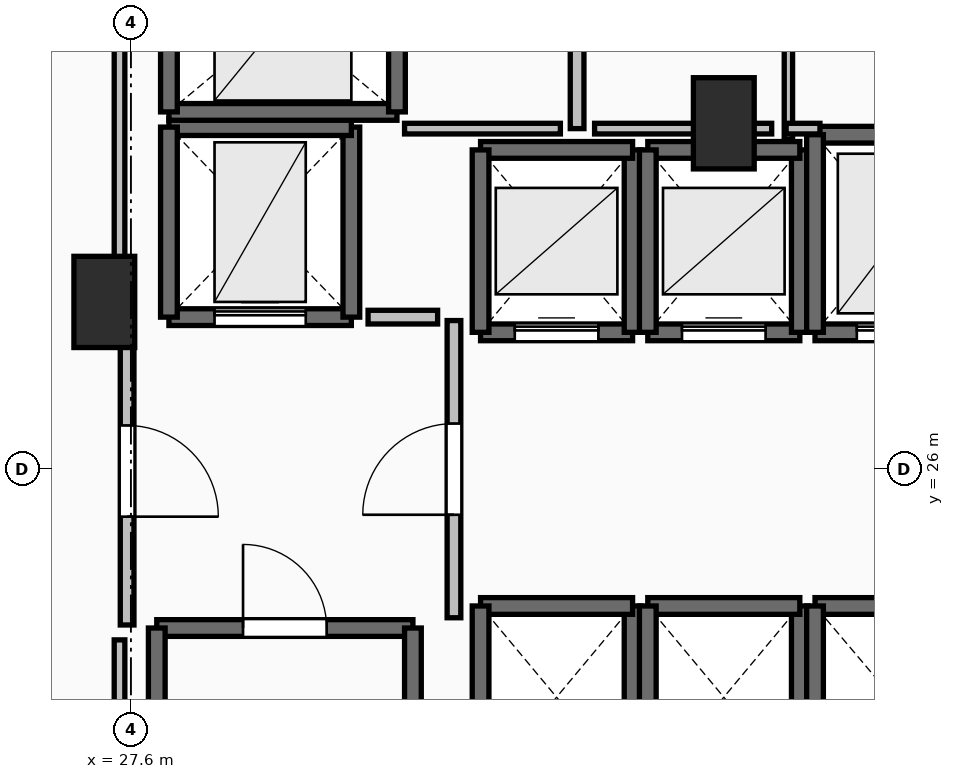
"""IFC4 building model, lengths in metres.
Left out: names, types, materials, properties, quantities, classifications, styles, units other than length and angle.
Written with IfcOpenShell. Run it as: python <this file> out.ifc"""

import sys

from ifc_helpers import new_model, si_unit, direction, frame, frame_2d, origin, origin_2d, place, context, subcontext, project, spatial, rectangle, extrude, element, fill, save


model = new_model("IFC4")
c1 = context("Model", 3, precision=1e-05, world=origin(), true_north=direction((0.0, 1.0)))
c2 = subcontext(c1, "Body", "Model", "MODEL_VIEW")
j1 = project(units=[si_unit("LENGTHUNIT", "METRE"), si_unit("PLANEANGLEUNIT", "RADIAN")], contexts=[c1])
p1 = place(None, origin())
s1 = spatial("IfcSite", under=j1, at=p1, CompositionType="ELEMENT")
p2 = place(p1, origin())
s2 = spatial("IfcBuilding", under=s1, at=p2, CompositionType="ELEMENT")
p3 = place(p2, frame((0.0, 0.0, 24.0)))
s3 = spatial("IfcBuildingStorey", under=s2, at=p3, CompositionType="ELEMENT", Elevation=24.0)
for number, where, z_axis, x_axis in (
    (1, (27.25, 28.2, 0.0), (0.0, 0.0, 1.0), (1.0, 0.0, 0.0)),
    (2, (35.4, 30.55, 0.0), (0.0, 0.0, 1.0), (1.0, 0.0, 0.0)),
):
    element("IfcColumn", number, at=place(p3, frame(where, z_axis=z_axis, x_axis=x_axis)), inside=s3, PredefinedType="PILASTER", context=c2, shape_type="SweptSolid", body=[
        extrude(rectangle(XDim=0.8, YDim=1.2, at=origin_2d()), origin(), (0.0, 0.0, 1.0), 3.5),
    ])
p4 = place(p3, frame((27.94, 23.91, 0.0), z_axis=(0.0, 0.0, 1.0), x_axis=(1.0, 0.0, 0.0)))
e3 = element("IfcWall", 3, at=p4, inside=s3, PredefinedType="SOLIDWALL", context=c2, shape_type="SweptSolid", body=[
    extrude(rectangle(XDim=3.37, YDim=0.22, at=frame_2d((1.685, 0.0))), origin(), (0.0, 0.0, 1.0), 3.24),
])
p5 = place(p4, frame((1.135, 0.0, 0.0)))
e4 = element("IfcOpeningElement", 4, at=p5, cuts=e3, PredefinedType="OPENING", context=c2, shape_type="SweptSolid", body=[
    extrude(rectangle(XDim=1.1, YDim=2.15, at=frame_2d((0.55, 1.075))), frame((0.0, 0.125, 0.0), z_axis=(0.0, -1.0, 0.0), x_axis=(1.0, 0.0, 0.0)), (0.0, 0.0, 1.0), 0.25),
])
for number, where, z_axis, x_axis in (
    (5, (31.31, 23.91, 0.0), (0.0, 0.0, 1.0), (0.0, -1.0, 0.0)),
    (6, (27.94, 16.49, 0.0), (0.0, 0.0, 1.0), (0.0, 1.0, 0.0)),
):
    element("IfcWall", number, at=place(p3, frame(where, z_axis=z_axis, x_axis=x_axis)), inside=s3, PredefinedType="SOLIDWALL", context=c2, shape_type="SweptSolid", body=[
        extrude(rectangle(XDim=7.42, YDim=0.22, at=frame_2d((3.71, 0.0))), origin(), (0.0, 0.0, 1.0), 3.24),
    ])
p6 = place(p3, frame((32.2, 27.8, 0.0), z_axis=(0.0, 0.0, 1.0), x_axis=(1.0, 0.0, 0.0)))
e7 = element("IfcWall", 7, at=p6, inside=s3, PredefinedType="SOLIDWALL", context=c2, shape_type="SweptSolid", body=[
    extrude(rectangle(XDim=2.0, YDim=0.22, at=frame_2d((1.0, 0.0))), origin(), (0.0, 0.0, 1.0), 3.24),
])
p7 = place(p6, frame((0.45, 0.0, 0.0)))
e8 = element("IfcOpeningElement", 8, at=p7, cuts=e7, PredefinedType="OPENING", context=c2, shape_type="SweptSolid", body=[
    extrude(rectangle(XDim=1.1, YDim=2.2, at=frame_2d((0.55, 1.1))), frame((0.0, 0.125, 0.0), z_axis=(0.0, -1.0, 0.0), x_axis=(1.0, 0.0, 0.0)), (0.0, 0.0, 1.0), 0.25),
])
p8 = place(p3, frame((34.2, 27.8, 0.0), z_axis=(0.0, 0.0, 1.0), x_axis=(0.0, 1.0, 0.0)))
e9 = element("IfcWall", 9, at=p8, inside=s3, PredefinedType="SOLIDWALL", context=c2, shape_type="SweptSolid", body=[
    extrude(rectangle(XDim=2.4, YDim=0.22, at=frame_2d((1.2, 0.0))), origin(), (0.0, 0.0, 1.0), 3.24),
])
p9 = place(p3, frame((34.2, 30.2, 0.0), z_axis=(0.0, 0.0, 1.0), x_axis=(-1.0, 0.0, 0.0)))
e10 = element("IfcWall", 10, at=p9, inside=s3, PredefinedType="SOLIDWALL", context=c2, shape_type="SweptSolid", body=[
    extrude(rectangle(XDim=2.0, YDim=0.22, at=frame_2d((1.0, 0.0))), origin(), (0.0, 0.0, 1.0), 3.24),
])
p10 = place(p3, frame((32.2, 30.2, 0.0), z_axis=(0.0, 0.0, 1.0), x_axis=(0.0, -1.0, 0.0)))
e11 = element("IfcWall", 11, at=p10, inside=s3, PredefinedType="SOLIDWALL", context=c2, shape_type="SweptSolid", body=[
    extrude(rectangle(XDim=2.4, YDim=0.22, at=frame_2d((1.2, 0.0))), origin(), (0.0, 0.0, 1.0), 3.24),
])
p11 = place(p3, frame((34.4, 27.8, 0.0), z_axis=(0.0, 0.0, 1.0), x_axis=(1.0, 0.0, 0.0)))
e12 = element("IfcWall", 12, at=p11, inside=s3, PredefinedType="SOLIDWALL", context=c2, shape_type="SweptSolid", body=[
    extrude(rectangle(XDim=2.0, YDim=0.22, at=frame_2d((1.0, 0.0))), origin(), (0.0, 0.0, 1.0), 3.24),
])
p12 = place(p11, frame((0.45, 0.0, 0.0)))
e13 = element("IfcOpeningElement", 13, at=p12, cuts=e12, PredefinedType="OPENING", context=c2, shape_type="SweptSolid", body=[
    extrude(rectangle(XDim=1.1, YDim=2.2, at=frame_2d((0.55, 1.1))), frame((0.0, 0.125, 0.0), z_axis=(0.0, -1.0, 0.0), x_axis=(1.0, 0.0, 0.0)), (0.0, 0.0, 1.0), 0.25),
])
p13 = place(p3, frame((36.4, 27.8, 0.0), z_axis=(0.0, 0.0, 1.0), x_axis=(0.0, 1.0, 0.0)))
e14 = element("IfcWall", 14, at=p13, inside=s3, PredefinedType="SOLIDWALL", context=c2, shape_type="SweptSolid", body=[
    extrude(rectangle(XDim=2.4, YDim=0.22, at=frame_2d((1.2, 0.0))), origin(), (0.0, 0.0, 1.0), 3.24),
])
p14 = place(p3, frame((36.4, 30.2, 0.0), z_axis=(0.0, 0.0, 1.0), x_axis=(-1.0, 0.0, 0.0)))
e15 = element("IfcWall", 15, at=p14, inside=s3, PredefinedType="SOLIDWALL", context=c2, shape_type="SweptSolid", body=[
    extrude(rectangle(XDim=2.0, YDim=0.22, at=frame_2d((1.0, 0.0))), origin(), (0.0, 0.0, 1.0), 3.24),
])
p15 = place(p3, frame((34.4, 30.2, 0.0), z_axis=(0.0, 0.0, 1.0), x_axis=(0.0, -1.0, 0.0)))
e16 = element("IfcWall", 16, at=p15, inside=s3, PredefinedType="SOLIDWALL", context=c2, shape_type="SweptSolid", body=[
    extrude(rectangle(XDim=2.4, YDim=0.22, at=frame_2d((1.2, 0.0))), origin(), (0.0, 0.0, 1.0), 3.24),
])
p16 = place(p3, frame((36.6, 27.8, 0.0), z_axis=(0.0, 0.0, 1.0), x_axis=(1.0, 0.0, 0.0)))
e17 = element("IfcWall", 17, at=p16, inside=s3, PredefinedType="SOLIDWALL", context=c2, shape_type="SweptSolid", body=[
    extrude(rectangle(XDim=2.2, YDim=0.22, at=frame_2d((1.1, 0.0))), origin(), (0.0, 0.0, 1.0), 3.24),
])
p17 = place(p16, frame((0.55, 0.0, 0.0)))
e18 = element("IfcOpeningElement", 18, at=p17, cuts=e17, PredefinedType="OPENING", context=c2, shape_type="SweptSolid", body=[
    extrude(rectangle(XDim=1.1, YDim=2.2, at=frame_2d((0.55, 1.1))), frame((0.0, 0.125, 0.0), z_axis=(0.0, -1.0, 0.0), x_axis=(1.0, 0.0, 0.0)), (0.0, 0.0, 1.0), 0.25),
])
p18 = place(p3, frame((38.8, 30.4, 0.0), z_axis=(0.0, 0.0, 1.0), x_axis=(-1.0, 0.0, 0.0)))
e19 = element("IfcWall", 19, at=p18, inside=s3, PredefinedType="SOLIDWALL", context=c2, shape_type="SweptSolid", body=[
    extrude(rectangle(XDim=2.2, YDim=0.22, at=frame_2d((1.1, 0.0))), origin(), (0.0, 0.0, 1.0), 3.24),
])
p19 = place(p3, frame((36.6, 30.4, 0.0), z_axis=(0.0, 0.0, 1.0), x_axis=(0.0, -1.0, 0.0)))
e20 = element("IfcWall", 20, at=p19, inside=s3, PredefinedType="SOLIDWALL", context=c2, shape_type="SweptSolid", body=[
    extrude(rectangle(XDim=2.6, YDim=0.22, at=frame_2d((1.3, 0.0))), origin(), (0.0, 0.0, 1.0), 3.24),
])
p20 = place(p3, frame((34.2, 21.8, 0.0), z_axis=(0.0, 0.0, 1.0), x_axis=(0.0, 1.0, 0.0)))
e21 = element("IfcWall", 21, at=p20, inside=s3, PredefinedType="SOLIDWALL", context=c2, shape_type="SweptSolid", body=[
    extrude(rectangle(XDim=2.4, YDim=0.22, at=frame_2d((1.2, 0.0))), origin(), (0.0, 0.0, 1.0), 3.24),
])
p21 = place(p3, frame((34.2, 24.2, 0.0), z_axis=(0.0, 0.0, 1.0), x_axis=(-1.0, 0.0, 0.0)))
e22 = element("IfcWall", 22, at=p21, inside=s3, PredefinedType="SOLIDWALL", context=c2, shape_type="SweptSolid", body=[
    extrude(rectangle(XDim=2.0, YDim=0.22, at=frame_2d((1.0, 0.0))), origin(), (0.0, 0.0, 1.0), 3.24),
])
for number, where, z_axis, x_axis in (
    (23, (32.2, 24.2, 0.0), (0.0, 0.0, 1.0), (0.0, -1.0, 0.0)),
    (24, (36.4, 21.8, 0.0), (0.0, 0.0, 1.0), (0.0, 1.0, 0.0)),
):
    element("IfcWall", number, at=place(p3, frame(where, z_axis=z_axis, x_axis=x_axis)), inside=s3, PredefinedType="SOLIDWALL", context=c2, shape_type="SweptSolid", body=[
        extrude(rectangle(XDim=2.4, YDim=0.22, at=frame_2d((1.2, 0.0))), origin(), (0.0, 0.0, 1.0), 3.24),
    ])
p22 = place(p3, frame((36.4, 24.2, 0.0), z_axis=(0.0, 0.0, 1.0), x_axis=(-1.0, 0.0, 0.0)))
e25 = element("IfcWall", 25, at=p22, inside=s3, PredefinedType="SOLIDWALL", context=c2, shape_type="SweptSolid", body=[
    extrude(rectangle(XDim=2.0, YDim=0.22, at=frame_2d((1.0, 0.0))), origin(), (0.0, 0.0, 1.0), 3.24),
])
p23 = place(p3, frame((34.4, 24.2, 0.0), z_axis=(0.0, 0.0, 1.0), x_axis=(0.0, -1.0, 0.0)))
e26 = element("IfcWall", 26, at=p23, inside=s3, PredefinedType="SOLIDWALL", context=c2, shape_type="SweptSolid", body=[
    extrude(rectangle(XDim=2.4, YDim=0.22, at=frame_2d((1.2, 0.0))), origin(), (0.0, 0.0, 1.0), 3.24),
])
p24 = place(p3, frame((38.8, 24.2, 0.0), z_axis=(0.0, 0.0, 1.0), x_axis=(-1.0, 0.0, 0.0)))
e27 = element("IfcWall", 27, at=p24, inside=s3, PredefinedType="SOLIDWALL", context=c2, shape_type="SweptSolid", body=[
    extrude(rectangle(XDim=2.2, YDim=0.22, at=frame_2d((1.1, 0.0))), origin(), (0.0, 0.0, 1.0), 3.24),
])
p25 = place(p3, frame((36.6, 24.2, 0.0), z_axis=(0.0, 0.0, 1.0), x_axis=(0.0, -1.0, 0.0)))
e28 = element("IfcWall", 28, at=p25, inside=s3, PredefinedType="SOLIDWALL", context=c2, shape_type="SweptSolid", body=[
    extrude(rectangle(XDim=2.6, YDim=0.22, at=frame_2d((1.3, 0.0))), origin(), (0.0, 0.0, 1.0), 3.24),
])
p26 = place(p3, frame((28.1, 28.0, 0.0), z_axis=(0.0, 0.0, 1.0), x_axis=(1.0, 0.0, 0.0)))
e29 = element("IfcWall", 29, at=p26, inside=s3, PredefinedType="SHEAR", context=c2, shape_type="SweptSolid", body=[
    extrude(rectangle(XDim=2.4, YDim=0.22, at=frame_2d((1.2, 0.0))), origin(), (0.0, 0.0, 1.0), 3.24),
])
p27 = place(p26, frame((0.6, 0.0, 0.0)))
e30 = element("IfcOpeningElement", 30, at=p27, cuts=e29, PredefinedType="OPENING", context=c2, shape_type="SweptSolid", body=[
    extrude(rectangle(XDim=1.2, YDim=2.2, at=frame_2d((0.6, 1.1))), frame((0.0, 0.125, 0.0), z_axis=(0.0, -1.0, 0.0), x_axis=(1.0, 0.0, 0.0)), (0.0, 0.0, 1.0), 0.25),
])
p28 = place(p3, frame((30.5, 28.0, 0.0), z_axis=(0.0, 0.0, 1.0), x_axis=(0.0, 1.0, 0.0)))
e31 = element("IfcWall", 31, at=p28, inside=s3, PredefinedType="SHEAR", context=c2, shape_type="SweptSolid", body=[
    extrude(rectangle(XDim=2.5, YDim=0.22, at=frame_2d((1.25, 0.0))), origin(), (0.0, 0.0, 1.0), 3.24),
])
p29 = place(p3, frame((30.5, 30.5, 0.0), z_axis=(0.0, 0.0, 1.0), x_axis=(-1.0, 0.0, 0.0)))
e32 = element("IfcWall", 32, at=p29, inside=s3, PredefinedType="SHEAR", context=c2, shape_type="SweptSolid", body=[
    extrude(rectangle(XDim=2.4, YDim=0.22, at=frame_2d((1.2, 0.0))), origin(), (0.0, 0.0, 1.0), 3.24),
])
p30 = place(p3, frame((28.1, 30.5, 0.0), z_axis=(0.0, 0.0, 1.0), x_axis=(0.0, -1.0, 0.0)))
e33 = element("IfcWall", 33, at=p30, inside=s3, PredefinedType="SHEAR", context=c2, shape_type="SweptSolid", body=[
    extrude(rectangle(XDim=2.5, YDim=0.22, at=frame_2d((1.25, 0.0))), origin(), (0.0, 0.0, 1.0), 3.24),
])
p31 = place(p3, frame((28.1, 30.7, 0.0), z_axis=(0.0, 0.0, 1.0), x_axis=(1.0, 0.0, 0.0)))
e34 = element("IfcWall", 34, at=p31, inside=s3, PredefinedType="SOLIDWALL", context=c2, shape_type="SweptSolid", body=[
    extrude(rectangle(XDim=3.0, YDim=0.22, at=frame_2d((1.5, 0.0))), origin(), (0.0, 0.0, 1.0), 3.24),
])
for number, where, z_axis, x_axis in (
    (35, (31.1, 30.7, 0.0), (0.0, 0.0, 1.0), (0.0, 1.0, 0.0)),
    (36, (28.1, 33.2, 0.0), (0.0, 0.0, 1.0), (0.0, -1.0, 0.0)),
):
    element("IfcWall", number, at=place(p3, frame(where, z_axis=z_axis, x_axis=x_axis)), inside=s3, PredefinedType="SOLIDWALL", context=c2, shape_type="SweptSolid", body=[
        extrude(rectangle(XDim=2.5, YDim=0.22, at=frame_2d((1.25, 0.0))), origin(), (0.0, 0.0, 1.0), 3.24),
    ])
p32 = place(p3, frame((31.85, 24.045, 0.0), z_axis=(0.0, 0.0, 1.0), x_axis=(0.0, 1.0, 0.0)))
e37 = element("IfcWall", 37, at=p32, inside=s3, PredefinedType="PARTITIONING", context=c2, shape_type="SweptSolid", body=[
    extrude(rectangle(XDim=3.91, YDim=0.18, at=frame_2d((1.955, 0.0))), origin(), (0.0, 0.0, 1.0), 3.24),
])
p33 = place(p32, frame((1.355, 0.0, 0.0)))
e38 = element("IfcOpeningElement", 38, at=p33, cuts=e37, PredefinedType="OPENING", context=c2, shape_type="SweptSolid", body=[
    extrude(rectangle(XDim=1.2, YDim=2.15, at=frame_2d((0.6, 1.075))), frame((0.0, 0.105, 0.0), z_axis=(0.0, -1.0, 0.0), x_axis=(1.0, 0.0, 0.0)), (0.0, 0.0, 1.0), 0.21),
])
p34 = place(p3, frame((27.55, 28.0, 0.0), z_axis=(0.0, 0.0, 1.0), x_axis=(0.0, -1.0, 0.0)))
e39 = element("IfcWall", 39, at=p34, inside=s3, PredefinedType="PARTITIONING", context=c2, shape_type="SweptSolid", body=[
    extrude(rectangle(XDim=4.05, YDim=0.18, at=frame_2d((2.025, 0.0))), origin(), (0.0, 0.0, 1.0), 3.24),
])
p35 = place(p34, frame((1.425, 0.0, 0.0)))
e40 = element("IfcOpeningElement", 40, at=p35, cuts=e39, PredefinedType="OPENING", context=c2, shape_type="SweptSolid", body=[
    extrude(rectangle(XDim=1.2, YDim=2.15, at=frame_2d((0.6, 1.075))), frame((0.0, 0.105, 0.0), z_axis=(0.0, -1.0, 0.0), x_axis=(1.0, 0.0, 0.0)), (0.0, 0.0, 1.0), 0.21),
])
p36 = place(p3, frame((33.47, 30.48, 0.0), z_axis=(0.0, 0.0, 1.0), x_axis=(0.0, 1.0, 0.0)))
e41 = element("IfcWall", 41, at=p36, inside=s3, PredefinedType="PARTITIONING", context=c2, shape_type="SweptSolid", body=[
    extrude(rectangle(XDim=3.28, YDim=0.18, at=frame_2d((1.64, 0.0))), origin(), (0.0, 0.0, 1.0), 3.24),
])
p37 = place(p36, frame((1.215, 0.0, 0.0)))
e42 = element("IfcOpeningElement", 42, at=p37, cuts=e41, PredefinedType="OPENING", context=c2, shape_type="SweptSolid", body=[
    extrude(rectangle(XDim=0.85, YDim=2.1, at=frame_2d((0.425, 1.05))), frame((0.0, 0.105, 0.0), z_axis=(0.0, -1.0, 0.0), x_axis=(1.0, 0.0, 0.0)), (0.0, 0.0, 1.0), 0.21),
])
p38 = place(p3, frame((36.25, 30.34, 0.0), z_axis=(0.0, 0.0, 1.0), x_axis=(0.0, 1.0, 0.0)))
e43 = element("IfcWall", 43, at=p38, inside=s3, PredefinedType="PARTITIONING", context=c2, shape_type="SweptSolid", body=[
    extrude(rectangle(XDim=3.56, YDim=0.11, at=frame_2d((1.78, 0.0))), origin(), (0.0, 0.0, 1.0), 2.432),
])
p39 = place(p3, frame((31.635, 28.0, 0.0), z_axis=(0.0, 0.0, 1.0), x_axis=(-1.0, 0.0, 0.0)))
e44 = element("IfcWall", 44, at=p39, inside=s3, PredefinedType="PARTITIONING", context=c2, shape_type="SweptSolid", body=[
    extrude(rectangle(XDim=0.915, YDim=0.18, at=frame_2d((0.458, 0.0))), origin(), (0.0, 0.0, 1.0), 3.24),
])
p40 = place(p3, frame((31.2, 30.48, 0.0), z_axis=(0.0, 0.0, 1.0), x_axis=(1.0, 0.0, 0.0)))
e45 = element("IfcWall", 45, at=p40, inside=s3, PredefinedType="PARTITIONING", context=c2, shape_type="SweptSolid", body=[
    extrude(rectangle(XDim=2.05, YDim=0.14, at=frame_2d((1.025, 0.0))), origin(), (0.0, 0.0, 1.0), 3.24),
])
p41 = place(p3, frame((33.7, 30.48, 0.0), z_axis=(0.0, 0.0, 1.0), x_axis=(1.0, 0.0, 0.0)))
e46 = element("IfcWall", 46, at=p41, inside=s3, PredefinedType="PARTITIONING", context=c2, shape_type="SweptSolid", body=[
    extrude(rectangle(XDim=2.33, YDim=0.14, at=frame_2d((1.165, 0.0))), origin(), (0.0, 0.0, 1.0), 2.432),
])
p42 = place(p3, frame((36.22, 30.48, 0.0), z_axis=(0.0, 0.0, 1.0), x_axis=(1.0, 0.0, 0.0)))
e47 = element("IfcWall", 47, at=p42, inside=s3, PredefinedType="PARTITIONING", context=c2, shape_type="SweptSolid", body=[
    extrude(rectangle(XDim=0.445, YDim=0.14, at=frame_2d((0.223, 0.0))), origin(), (0.0, 0.0, 1.0), 2.432),
])
p43 = place(p3, frame((27.45, 16.24, 0.0), z_axis=(0.0, 0.0, 1.0), x_axis=(0.0, 1.0, 0.0)))
e48 = element("IfcWall", 48, at=p43, inside=s3, PredefinedType="PARTITIONING", context=c2, shape_type="SweptSolid", body=[
    extrude(rectangle(XDim=7.514, YDim=0.14, at=frame_2d((3.757, 0.0))), origin(), (0.0, 0.0, 1.0), 2.432),
])
p44 = place(p3, frame((27.45, 28.196, 0.0), z_axis=(0.0, 0.0, 1.0), x_axis=(0.0, 1.0, 0.0)))
e49 = element("IfcWall", 49, at=p44, inside=s3, PredefinedType="PARTITIONING", context=c2, shape_type="SweptSolid", body=[
    extrude(rectangle(XDim=5.254, YDim=0.14, at=frame_2d((2.627, 0.0))), origin(), (0.0, 0.0, 1.0), 2.432),
])
p45 = place(p5, origin())
e50 = element("IfcDoor", 50, at=p45, inside=s3, OperationType="SINGLE_SWING_LEFT", PredefinedType="DOOR", context=c2, shape_type="SweptSolid", body=[
    extrude(rectangle(XDim=1.1, YDim=2.15, at=frame_2d((0.55, 1.075))), frame((0.0, 0.025, 0.0), z_axis=(0.0, -1.0, 0.0), x_axis=(1.0, 0.0, 0.0)), (0.0, 0.0, 1.0), 0.05),
])
fill(e4, e50)
p46 = place(p7, origin())
e51 = element("IfcDoor", 51, at=p46, inside=s3, OperationType="SLIDING_TO_LEFT", PredefinedType="DOOR", context=c2, shape_type="SweptSolid", body=[
    extrude(rectangle(XDim=1.1, YDim=2.2, at=frame_2d((0.55, 1.1))), frame((0.0, 0.025, 0.0), z_axis=(0.0, -1.0, 0.0), x_axis=(1.0, 0.0, 0.0)), (0.0, 0.0, 1.0), 0.05),
])
fill(e8, e51)
p47 = place(p12, origin())
e52 = element("IfcDoor", 52, at=p47, inside=s3, OperationType="SLIDING_TO_LEFT", PredefinedType="DOOR", context=c2, shape_type="SweptSolid", body=[
    extrude(rectangle(XDim=1.1, YDim=2.2, at=frame_2d((0.55, 1.1))), frame((0.0, 0.025, 0.0), z_axis=(0.0, -1.0, 0.0), x_axis=(1.0, 0.0, 0.0)), (0.0, 0.0, 1.0), 0.05),
])
fill(e13, e52)
p48 = place(p17, origin())
e53 = element("IfcDoor", 53, at=p48, inside=s3, OperationType="SLIDING_TO_LEFT", PredefinedType="DOOR", context=c2, shape_type="SweptSolid", body=[
    extrude(rectangle(XDim=1.1, YDim=2.2, at=frame_2d((0.55, 1.1))), frame((0.0, 0.025, 0.0), z_axis=(0.0, -1.0, 0.0), x_axis=(1.0, 0.0, 0.0)), (0.0, 0.0, 1.0), 0.05),
])
fill(e18, e53)
p49 = place(p27, origin())
e54 = element("IfcDoor", 54, at=p49, inside=s3, OperationType="SLIDING_TO_LEFT", PredefinedType="DOOR", context=c2, shape_type="SweptSolid", body=[
    extrude(rectangle(XDim=1.2, YDim=2.2, at=frame_2d((0.6, 1.1))), frame((0.0, 0.025, 0.0), z_axis=(0.0, -1.0, 0.0), x_axis=(1.0, 0.0, 0.0)), (0.0, 0.0, 1.0), 0.05),
])
fill(e30, e54)
p50 = place(p33, origin())
e55 = element("IfcDoor", 55, at=p50, inside=s3, OperationType="SINGLE_SWING_LEFT", PredefinedType="DOOR", context=c2, shape_type="SweptSolid", body=[
    extrude(rectangle(XDim=1.2, YDim=2.15, at=frame_2d((0.6, 1.075))), frame((0.0, 0.025, 0.0), z_axis=(0.0, -1.0, 0.0), x_axis=(1.0, 0.0, 0.0)), (0.0, 0.0, 1.0), 0.05),
])
fill(e38, e55)
p51 = place(p35, origin())
e56 = element("IfcDoor", 56, at=p51, inside=s3, OperationType="SINGLE_SWING_RIGHT", PredefinedType="DOOR", context=c2, shape_type="SweptSolid", body=[
    extrude(rectangle(XDim=1.2, YDim=2.15, at=frame_2d((0.6, 1.075))), frame((0.0, 0.025, 0.0), z_axis=(0.0, -1.0, 0.0), x_axis=(1.0, 0.0, 0.0)), (0.0, 0.0, 1.0), 0.05),
])
fill(e40, e56)
save(model, sys.argv[1])
